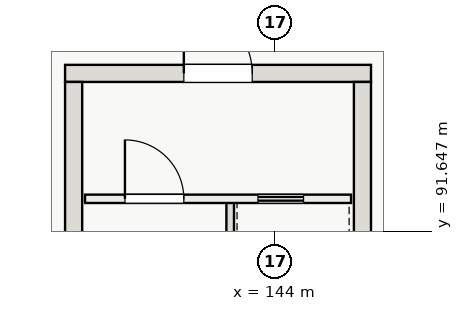
"""IFC4 building model, lengths in metres.
Left out: names, types, materials, properties, quantities, classifications, styles, units other than length and angle.
Written with IfcOpenShell. Run it as: python <this file> out.ifc"""

import sys

from ifc_helpers import new_model, si_unit, direction, frame, frame_2d, origin, place, context, subcontext, project, spatial, rectangle, extrude, element, fill, save


model = new_model("IFC4")
c1 = context("Model", 3, precision=1e-05, world=origin(), true_north=direction((0.0, 1.0)))
c2 = subcontext(c1, "Body", "Model", "MODEL_VIEW")
j1 = project(units=[si_unit("LENGTHUNIT", "METRE"), si_unit("PLANEANGLEUNIT", "RADIAN")], contexts=[c1])
p1 = place(None, origin())
s1 = spatial("IfcSite", under=j1, at=p1, CompositionType="ELEMENT")
p2 = place(p1, origin())
s2 = spatial("IfcBuilding", under=s1, at=p2, CompositionType="ELEMENT")
p3 = place(p2, frame((0.0, 0.0, 21.6)))
s3 = spatial("IfcBuildingStorey", under=s2, at=p3, CompositionType="ELEMENT", Elevation=21.6)
p4 = place(p3, frame((138.475, 95.8, 0.0), z_axis=(0.0, 0.0, 1.0), x_axis=(1.0, 0.0, 0.0)))
e1 = element("IfcWall", 1, at=p4, inside=s3, PredefinedType="SHEAR", context=c2, shape_type="SweptSolid", body=[
    extrude(rectangle(XDim=8.05, YDim=0.45, at=frame_2d((4.025, 0.0))), origin(), (0.0, 0.0, 1.0), 4.8),
])
p5 = place(p4, frame((3.125, 0.0, 0.0)))
e2 = element("IfcOpeningElement", 2, at=p5, cuts=e1, PredefinedType="OPENING", context=c2, shape_type="SweptSolid", body=[
    extrude(rectangle(XDim=1.8, YDim=2.3, at=frame_2d((0.9, 1.15))), frame((0.0, 0.235, 0.0), z_axis=(0.0, -1.0, 0.0), x_axis=(1.0, 0.0, 0.0)), (0.0, 0.0, 1.0), 0.47),
])
for number, where, z_axis, x_axis in (
    (3, (138.7, 84.425, 0.0), (0.0, 0.0, 1.0), (0.0, 1.0, 0.0)),
    (4, (146.3, 84.425, 0.0), (0.0, 0.0, 1.0), (0.0, 1.0, 0.0)),
):
    element("IfcWall", number, at=place(p3, frame(where, z_axis=z_axis, x_axis=x_axis)), inside=s3, PredefinedType="SHEAR", context=c2, shape_type="SweptSolid", body=[
        extrude(rectangle(XDim=11.15, YDim=0.45, at=frame_2d((5.575, 0.0))), origin(), (0.0, 0.0, 1.0), 4.8),
    ])
p6 = place(p3, frame((142.82, 84.45, 0.0), z_axis=(0.0, 0.0, 1.0), x_axis=(0.0, 1.0, 0.0)))
e5 = element("IfcWall", 5, at=p6, inside=s3, PredefinedType="SOLIDWALL", context=c2, shape_type="SweptSolid", body=[
    extrude(rectangle(XDim=8.0, YDim=0.2, at=frame_2d((4.0, 0.0))), origin(), (0.0, 0.0, 1.0), 4.8),
])
p7 = place(p3, frame((139.0, 92.5, 0.0), z_axis=(0.0, 0.0, 1.0), x_axis=(1.0, 0.0, 0.0)))
e6 = element("IfcWall", 6, at=p7, inside=s3, PredefinedType="SOLIDWALL", context=c2, shape_type="SweptSolid", body=[
    extrude(rectangle(XDim=7.0, YDim=0.22, at=frame_2d((3.5, 0.0))), origin(), (0.0, 0.0, 1.0), 4.53),
])
p8 = place(p7, frame((1.05, 0.0, 0.0)))
e7 = element("IfcOpeningElement", 7, at=p8, cuts=e6, PredefinedType="OPENING", context=c2, shape_type="SweptSolid", body=[
    extrude(rectangle(XDim=1.55, YDim=2.2, at=frame_2d((0.775, 1.1))), frame((0.0, 0.12, 0.0), z_axis=(0.0, -1.0, 0.0), x_axis=(1.0, 0.0, 0.0)), (0.0, 0.0, 1.0), 0.24),
])
p9 = place(p7, frame((4.55, 0.0, 0.0)))
e8 = element("IfcOpeningElement", 8, at=p9, cuts=e6, PredefinedType="OPENING", context=c2, shape_type="SweptSolid", body=[
    extrude(rectangle(XDim=1.2, YDim=2.2, at=frame_2d((0.6, 1.1))), frame((0.0, 0.12, 0.0), z_axis=(0.0, -1.0, 0.0), x_axis=(1.0, 0.0, 0.0)), (0.0, 0.0, 1.0), 0.24),
])
p10 = place(p8, origin())
e9 = element("IfcDoor", 9, at=p10, inside=s3, OperationType="SINGLE_SWING_LEFT", PredefinedType="DOOR", context=c2, shape_type="SweptSolid", body=[
    extrude(rectangle(XDim=1.55, YDim=2.2, at=frame_2d((0.775, 1.1))), frame((0.0, 0.025, 0.0), z_axis=(0.0, -1.0, 0.0), x_axis=(1.0, 0.0, 0.0)), (0.0, 0.0, 1.0), 0.05),
])
fill(e7, e9)
p11 = place(p9, origin())
e10 = element("IfcDoor", 10, at=p11, inside=s3, OperationType="SLIDING_TO_LEFT", PredefinedType="DOOR", context=c2, shape_type="SweptSolid", body=[
    extrude(rectangle(XDim=1.2, YDim=2.2, at=frame_2d((0.6, 1.1))), frame((0.0, 0.025, 0.0), z_axis=(0.0, -1.0, 0.0), x_axis=(1.0, 0.0, 0.0)), (0.0, 0.0, 1.0), 0.05),
])
fill(e8, e10)
p12 = place(p5, frame((1.8, 0.0, 0.0), z_axis=(0.0, 0.0, 1.0), x_axis=(-1.0, 0.0, 0.0)))
e11 = element("IfcDoor", 11, at=p12, inside=s3, OperationType="DOUBLE_DOOR_SINGLE_SWING", PredefinedType="DOOR", context=c2, shape_type="SweptSolid", body=[
    extrude(rectangle(XDim=1.8, YDim=2.3, at=frame_2d((0.9, 1.15))), frame((0.0, 0.025, 0.0), z_axis=(0.0, -1.0, 0.0), x_axis=(1.0, 0.0, 0.0)), (0.0, 0.0, 1.0), 0.05),
])
fill(e2, e11)
save(model, sys.argv[1])
